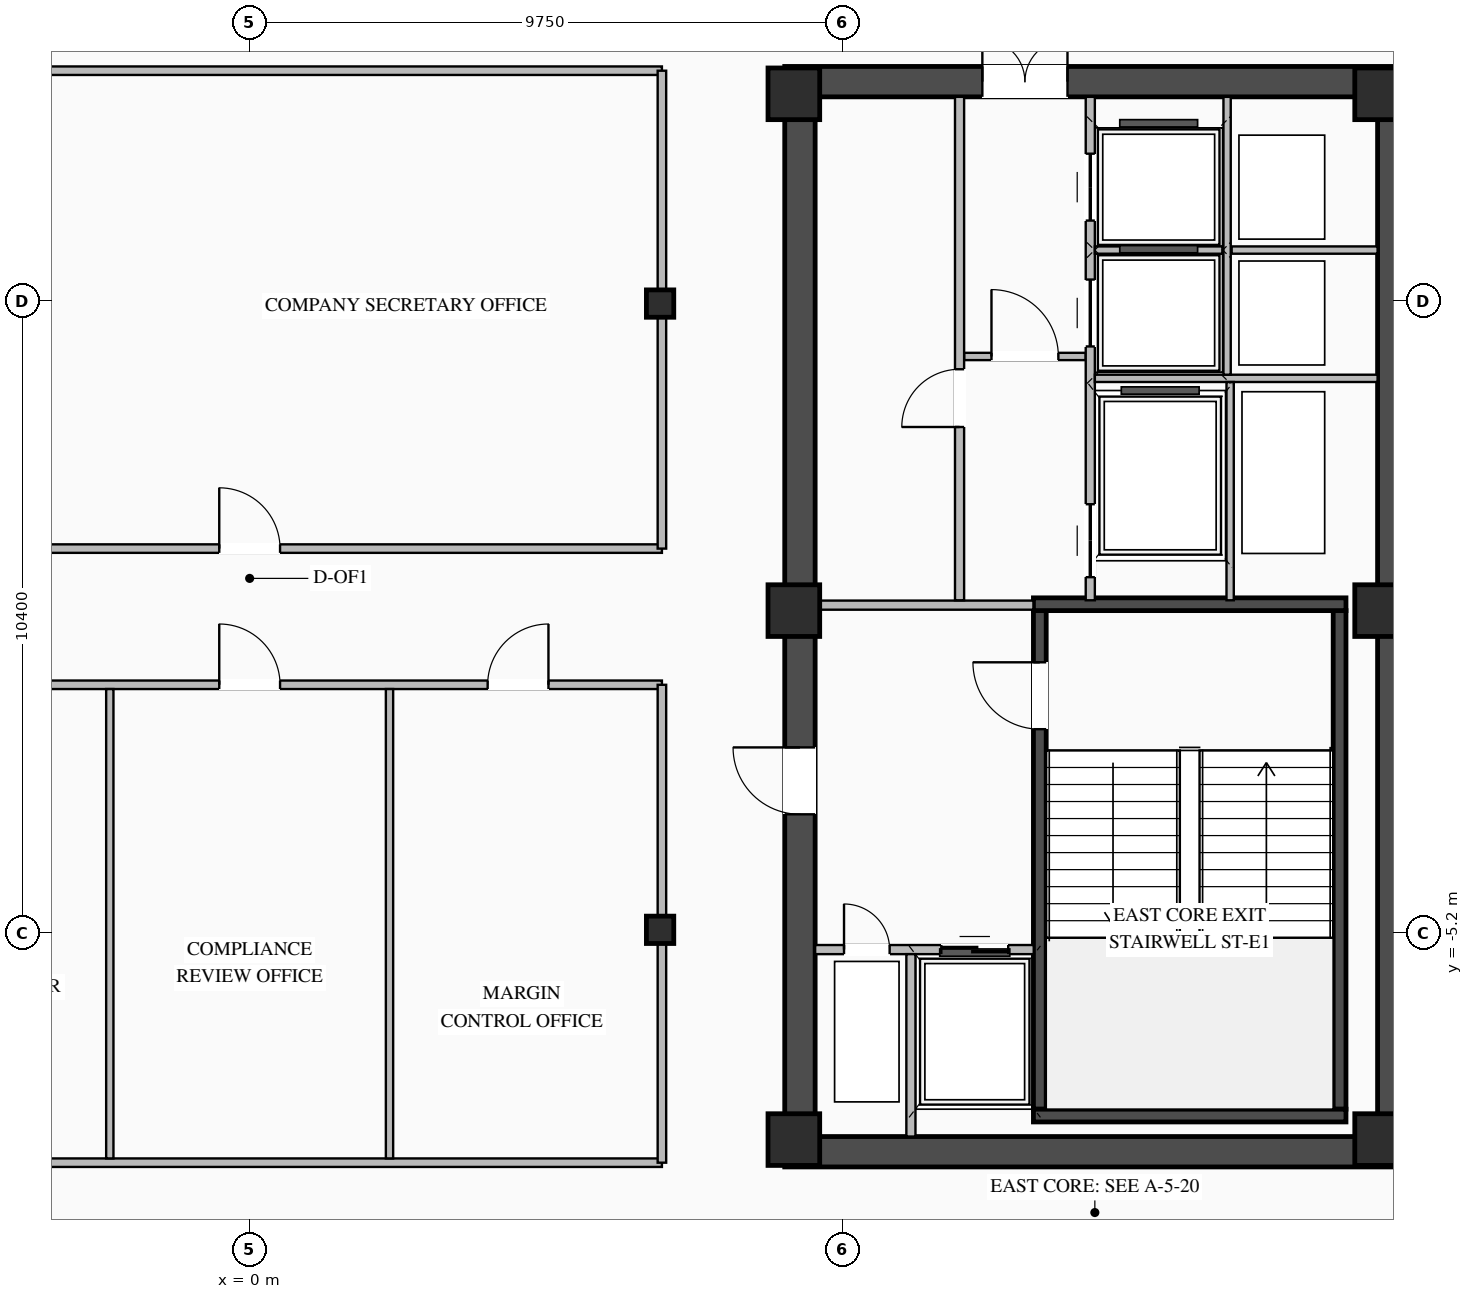
"""IFC4 building model, lengths in metres.
Left out: names, types, materials, properties, quantities, classifications, styles, units other than length and angle.
Written with IfcOpenShell. Run it as: python <this file> out.ifc"""

import sys

from ifc_helpers import new_model, si_unit, direction, frame, frame_2d, origin, origin_2d, place, context, subcontext, project, spatial, rectangle, i_section, extrude, element, fill, save


model = new_model("IFC4")
c1 = context("Model", 3, precision=1e-05, world=origin(), true_north=direction((0.0, 1.0)))
c2 = subcontext(c1, "Body", "Model", "MODEL_VIEW")
j1 = project(units=[si_unit("LENGTHUNIT", "METRE"), si_unit("PLANEANGLEUNIT", "RADIAN")], contexts=[c1])
p1 = place(None, origin())
s1 = spatial("IfcSite", under=j1, at=p1, CompositionType="ELEMENT")
p2 = place(p1, origin())
s2 = spatial("IfcBuilding", under=s1, at=p2, CompositionType="ELEMENT")
p3 = place(p2, frame((0.0, 0.0, 282.75)))
s3 = spatial("IfcBuildingStorey", under=s2, at=p3, CompositionType="ELEMENT", Elevation=282.75)
p4 = place(p3, frame((8.8, -8.8, 0.0), z_axis=(0.0, 0.0, 1.0), x_axis=(1.0, 0.0, 0.0)))
e1 = element("IfcWall", 1, at=p4, inside=s3, PredefinedType="SHEAR", context=c2, shape_type="SweptSolid", body=[
    extrude(rectangle(XDim=10.25, YDim=0.5, at=frame_2d((5.125, 0.0))), origin(), (0.0, 0.0, 1.0), 3.95),
])
p5 = place(p3, frame((8.8, 8.8, 0.0), z_axis=(0.0, 0.0, 1.0), x_axis=(1.0, 0.0, 0.0)))
e2 = element("IfcWall", 2, at=p5, inside=s3, PredefinedType="SHEAR", context=c2, shape_type="SweptSolid", body=[
    extrude(rectangle(XDim=10.25, YDim=0.5, at=frame_2d((5.125, 0.0))), origin(), (0.0, 0.0, 1.0), 3.95),
])
p6 = place(p5, frame((3.25, 0.0, 0.0)))
e3 = element("IfcOpeningElement", 3, at=p6, cuts=e2, PredefinedType="OPENING", context=c2, shape_type="SweptSolid", body=[
    extrude(rectangle(XDim=1.4, YDim=2.05, at=frame_2d((0.7, 1.025))), frame((0.0, 0.26, 0.0), z_axis=(0.0, -1.0, 0.0), x_axis=(1.0, 0.0, 0.0)), (0.0, 0.0, 1.0), 0.52),
])
p7 = place(p3, frame((9.05, -8.55, 0.0), z_axis=(0.0, 0.0, 1.0), x_axis=(0.0, 1.0, 0.0)))
e4 = element("IfcWall", 4, at=p7, inside=s3, PredefinedType="SHEAR", context=c2, shape_type="SweptSolid", body=[
    extrude(rectangle(XDim=17.1, YDim=0.5, at=frame_2d((8.55, 0.0))), origin(), (0.0, 0.0, 1.0), 3.95),
])
p8 = place(p7, frame((5.3, 0.0, 0.0)))
e5 = element("IfcOpeningElement", 5, at=p8, cuts=e4, PredefinedType="OPENING", context=c2, shape_type="SweptSolid", body=[
    extrude(rectangle(XDim=1.1, YDim=2.08, at=frame_2d((0.55, 1.04))), frame((0.0, 0.26, 0.0), z_axis=(0.0, -1.0, 0.0), x_axis=(1.0, 0.0, 0.0)), (0.0, 0.0, 1.0), 0.52),
])
p9 = place(p3, frame((18.8, -8.55, 0.0), z_axis=(0.0, 0.0, 1.0), x_axis=(0.0, 1.0, 0.0)))
e6 = element("IfcWall", 6, at=p9, inside=s3, PredefinedType="SHEAR", context=c2, shape_type="SweptSolid", body=[
    extrude(rectangle(XDim=17.1, YDim=0.5, at=frame_2d((8.55, 0.0))), origin(), (0.0, 0.0, 1.0), 3.95),
])
p10 = place(p3, frame((12.995, -8.1, 0.0), z_axis=(0.0, 0.0, 1.0), x_axis=(0.0, 1.0, 0.0)))
e7 = element("IfcWall", 7, at=p10, inside=s3, PredefinedType="SHEAR", context=c2, shape_type="SweptSolid", body=[
    extrude(rectangle(XDim=8.2, YDim=0.21, at=frame_2d((4.1, 0.0))), origin(), (0.0, 0.0, 1.0), 3.95),
])
p11 = place(p10, frame((6.25, 0.0, 0.0)))
e8 = element("IfcOpeningElement", 8, at=p11, cuts=e7, PredefinedType="OPENING", context=c2, shape_type="SweptSolid", body=[
    extrude(rectangle(XDim=1.1, YDim=2.15, at=frame_2d((0.55, 1.075))), frame((0.0, 0.115, 0.0), z_axis=(0.0, -1.0, 0.0), x_axis=(1.0, 0.0, 0.0)), (0.0, 0.0, 1.0), 0.23),
])
p12 = place(p3, frame((17.925, -8.1, 0.0), z_axis=(0.0, 0.0, 1.0), x_axis=(0.0, 1.0, 0.0)))
e9 = element("IfcWall", 9, at=p12, inside=s3, PredefinedType="SHEAR", context=c2, shape_type="SweptSolid", body=[
    extrude(rectangle(XDim=8.2, YDim=0.21, at=frame_2d((4.1, 0.0))), origin(), (0.0, 0.0, 1.0), 3.95),
])
for number, where, z_axis, x_axis in (
    (10, (12.89, -8.205, 0.0), (0.0, 0.0, 1.0), (1.0, 0.0, 0.0)),
    (11, (18.03, 0.205, 0.0), (0.0, 0.0, 1.0), (-1.0, 0.0, 0.0)),
):
    element("IfcWall", number, at=place(p3, frame(where, z_axis=z_axis, x_axis=x_axis)), inside=s3, PredefinedType="SHEAR", context=c2, shape_type="SweptSolid", body=[
        extrude(rectangle(XDim=5.14, YDim=0.21, at=frame_2d((2.57, 0.0))), origin(), (0.0, 0.0, 1.0), 3.95),
    ])
for number, where, z_axis, x_axis in (
    (12, (8.95, -8.6, 0.0), (0.0, 0.0, 1.0), (1.0, 0.0, 0.0)),
    (13, (8.95, 0.1, 0.0), (0.0, 0.0, 1.0), (1.0, 0.0, 0.0)),
    (14, (8.95, 8.6, 0.0), (0.0, 0.0, 1.0), (1.0, 0.0, 0.0)),
    (15, (18.6, -8.6, 0.0), (0.0, 0.0, 1.0), (1.0, 0.0, 0.0)),
    (16, (18.6, 0.1, 0.0), (0.0, 0.0, 1.0), (1.0, 0.0, 0.0)),
    (17, (18.6, 8.6, 0.0), (0.0, 0.0, 1.0), (1.0, 0.0, 0.0)),
):
    element("IfcColumn", number, at=place(p3, frame(where, z_axis=z_axis, x_axis=x_axis)), inside=s3, PredefinedType="COLUMN", context=c2, shape_type="SweptSolid", body=[
        extrude(rectangle(XDim=0.85, YDim=0.85, at=origin_2d()), origin(), (0.0, 0.0, 1.0), 4.2),
    ])
for number, where, z_axis, x_axis in (
    (18, (6.75, -5.15, 0.0), (0.0, 0.0, 1.0), (1.0, 0.0, 0.0)),
    (19, (6.75, 5.15, 0.0), (0.0, 0.0, 1.0), (1.0, 0.0, 0.0)),
):
    element("IfcColumn", number, at=place(p3, frame(where, z_axis=z_axis, x_axis=x_axis)), inside=s3, PredefinedType="COLUMN", context=c2, shape_type="SweptSolid", body=[
        extrude(i_section(OverallWidth=0.45, OverallDepth=0.45, WebThickness=0.022, FlangeThickness=0.032, at=origin_2d()), origin(), (0.0, 0.0, 1.0), 4.2),
    ])
p13 = place(p3, frame((9.3, -5.475, 0.0), z_axis=(0.0, 0.0, 1.0), x_axis=(1.0, 0.0, 0.0)))
e20 = element("IfcWall", 20, at=p13, inside=s3, PredefinedType="STANDARD", context=c2, shape_type="SweptSolid", body=[
    extrude(rectangle(XDim=3.595, YDim=0.15, at=frame_2d((1.797, 0.0))), origin(), (0.0, 0.0, 1.0), 3.93),
])
p14 = place(p13, frame((2.075, 0.0, 0.0)))
e21 = element("IfcOpeningElement", 21, at=p14, cuts=e20, PredefinedType="OPENING", context=c2, shape_type="SweptSolid", body=[
    extrude(rectangle(XDim=1.1, YDim=2.15, at=frame_2d((0.55, 1.075))), frame((0.0, 0.085, 0.0), z_axis=(0.0, -1.0, 0.0), x_axis=(1.0, 0.0, 0.0)), (0.0, 0.0, 1.0), 0.17),
])
p15 = place(p13, frame((0.475, 0.0, 0.0)))
e22 = element("IfcOpeningElement", 22, at=p15, cuts=e20, PredefinedType="OPENING", context=c2, shape_type="SweptSolid", body=[
    extrude(rectangle(XDim=0.75, YDim=2.05, at=frame_2d((0.375, 1.025))), frame((0.0, 0.085, 0.0), z_axis=(0.0, -1.0, 0.0), x_axis=(1.0, 0.0, 0.0)), (0.0, 0.0, 1.0), 0.17),
])
p16 = place(p3, frame((10.875, -8.55, 0.0), z_axis=(0.0, 0.0, 1.0), x_axis=(0.0, 1.0, 0.0)))
e23 = element("IfcWall", 23, at=p16, inside=s3, PredefinedType="STANDARD", context=c2, shape_type="SweptSolid", body=[
    extrude(rectangle(XDim=3.0, YDim=0.15, at=frame_2d((1.5, 0.0))), origin(), (0.0, 0.0, 1.0), 3.93),
])
p17 = place(p3, frame((9.3, 0.19, 0.0), z_axis=(0.0, 0.0, 1.0), x_axis=(1.0, 0.0, 0.0)))
e24 = element("IfcWall", 24, at=p17, inside=s3, PredefinedType="STANDARD", context=c2, shape_type="SweptSolid", body=[
    extrude(rectangle(XDim=3.59, YDim=0.15, at=frame_2d((1.795, 0.0))), origin(), (0.0, 0.0, 1.0), 3.425),
])
p18 = place(p3, frame((11.75, 4.28, 0.0), z_axis=(0.0, 0.0, 1.0), x_axis=(1.0, 0.0, 0.0)))
e25 = element("IfcWall", 25, at=p18, inside=s3, PredefinedType="STANDARD", context=c2, shape_type="SweptSolid", body=[
    extrude(rectangle(XDim=2.0, YDim=0.12, at=frame_2d((1.0, 0.0))), origin(), (0.0, 0.0, 1.0), 3.93),
])
p19 = place(p18, frame((0.45, 0.0, 0.0)))
e26 = element("IfcOpeningElement", 26, at=p19, cuts=e25, PredefinedType="OPENING", context=c2, shape_type="SweptSolid", body=[
    extrude(rectangle(XDim=1.1, YDim=2.1, at=frame_2d((0.55, 1.05))), frame((0.0, 0.07, 0.0), z_axis=(0.0, -1.0, 0.0), x_axis=(1.0, 0.0, 0.0)), (0.0, 0.0, 1.0), 0.14),
])
p20 = place(p3, frame((11.675, 0.27, 0.0), z_axis=(0.0, 0.0, 1.0), x_axis=(0.0, 1.0, 0.0)))
e27 = element("IfcWall", 27, at=p20, inside=s3, PredefinedType="STANDARD", context=c2, shape_type="SweptSolid", body=[
    extrude(rectangle(XDim=8.28, YDim=0.15, at=frame_2d((4.14, 0.0))), origin(), (0.0, 0.0, 1.0), 3.93),
])
p21 = place(p20, frame((2.85, 0.0, 0.0)))
e28 = element("IfcOpeningElement", 28, at=p21, cuts=e27, PredefinedType="OPENING", context=c2, shape_type="SweptSolid", body=[
    extrude(rectangle(XDim=0.95, YDim=2.05, at=frame_2d((0.475, 1.025))), frame((0.0, 0.085, 0.0), z_axis=(0.0, -1.0, 0.0), x_axis=(1.0, 0.0, 0.0)), (0.0, 0.0, 1.0), 0.17),
])
p22 = place(p3, frame((13.825, 0.27, 0.0), z_axis=(0.0, 0.0, 1.0), x_axis=(0.0, 1.0, 0.0)))
e29 = element("IfcWall", 29, at=p22, inside=s3, PredefinedType="STANDARD", context=c2, shape_type="SweptSolid", body=[
    extrude(rectangle(XDim=8.28, YDim=0.15, at=frame_2d((4.14, 0.0))), origin(), (0.0, 0.0, 1.0), 3.93),
])
p23 = place(p22, frame((4.175, 0.0, 0.0)))
e30 = element("IfcOpeningElement", 30, at=p23, cuts=e29, PredefinedType="OPENING", context=c2, shape_type="SweptSolid", body=[
    extrude(rectangle(XDim=1.1, YDim=2.1, at=frame_2d((0.55, 1.05))), frame((0.0, 0.085, 0.0), z_axis=(0.0, -1.0, 0.0), x_axis=(1.0, 0.0, 0.0)), (0.0, 0.0, 1.0), 0.17),
])
p24 = place(p22, frame((6.245, 0.0, 0.0)))
e31 = element("IfcOpeningElement", 31, at=p24, cuts=e29, PredefinedType="OPENING", context=c2, shape_type="SweptSolid", body=[
    extrude(rectangle(XDim=1.1, YDim=2.1, at=frame_2d((0.55, 1.05))), frame((0.0, 0.085, 0.0), z_axis=(0.0, -1.0, 0.0), x_axis=(1.0, 0.0, 0.0)), (0.0, 0.0, 1.0), 0.17),
])
p25 = place(p22, frame((0.38, 0.0, 0.0)))
e32 = element("IfcOpeningElement", 32, at=p25, cuts=e29, PredefinedType="OPENING", context=c2, shape_type="SweptSolid", body=[
    extrude(rectangle(XDim=1.2, YDim=2.1, at=frame_2d((0.6, 1.05))), frame((0.0, 0.085, 0.0), z_axis=(0.0, -1.0, 0.0), x_axis=(1.0, 0.0, 0.0)), (0.0, 0.0, 1.0), 0.17),
])
p26 = place(p3, frame((13.9, 3.92, 0.0), z_axis=(0.0, 0.0, 1.0), x_axis=(1.0, 0.0, 0.0)))
e33 = element("IfcWall", 33, at=p26, inside=s3, PredefinedType="STANDARD", context=c2, shape_type="SweptSolid", body=[
    extrude(rectangle(XDim=4.65, YDim=0.12, at=frame_2d((2.325, 0.0))), origin(), (0.0, 0.0, 1.0), 3.93),
])
p27 = place(p3, frame((16.15, 6.03, 0.0), z_axis=(0.0, 0.0, 1.0), x_axis=(1.0, 0.0, 0.0)))
e34 = element("IfcWall", 34, at=p27, inside=s3, PredefinedType="STANDARD", context=c2, shape_type="SweptSolid", body=[
    extrude(rectangle(XDim=2.4, YDim=0.12, at=frame_2d((1.2, 0.0))), origin(), (0.0, 0.0, 1.0), 3.93),
])
p28 = place(p3, frame((16.075, 3.98, 0.0), z_axis=(0.0, 0.0, 1.0), x_axis=(0.0, 1.0, 0.0)))
e35 = element("IfcWall", 35, at=p28, inside=s3, PredefinedType="STANDARD", context=c2, shape_type="SweptSolid", body=[
    extrude(rectangle(XDim=4.57, YDim=0.12, at=frame_2d((2.285, 0.0))), origin(), (0.0, 0.0, 1.0), 3.93),
])
p29 = place(p3, frame((13.9, 6.03, 0.0), z_axis=(0.0, 0.0, 1.0), x_axis=(1.0, 0.0, 0.0)))
e36 = element("IfcWall", 36, at=p29, inside=s3, PredefinedType="STANDARD", context=c2, shape_type="SweptSolid", body=[
    extrude(rectangle(XDim=2.1, YDim=0.12, at=frame_2d((1.05, 0.0))), origin(), (0.0, 0.0, 1.0), 3.93),
])
p30 = place(p3, frame((16.125, 0.27, 0.0), z_axis=(0.0, 0.0, 1.0), x_axis=(0.0, 1.0, 0.0)))
e37 = element("IfcWall", 37, at=p30, inside=s3, PredefinedType="STANDARD", context=c2, shape_type="SweptSolid", body=[
    extrude(rectangle(XDim=3.59, YDim=0.12, at=frame_2d((1.795, 0.0))), origin(), (0.0, 0.0, 1.0), 3.93),
])
p31 = place(p3, frame((-6.78, 1.12, 0.0), z_axis=(0.0, 0.0, 1.0), x_axis=(1.0, 0.0, 0.0)))
e38 = element("IfcWall", 38, at=p31, inside=s3, PredefinedType="STANDARD", context=c2, shape_type="SweptSolid", body=[
    extrude(rectangle(XDim=13.56, YDim=0.14, at=frame_2d((6.78, 0.0))), origin(), (0.0, 0.0, 1.0), 3.93),
])
p32 = place(p31, frame((6.28, 0.0, 0.0)))
e39 = element("IfcOpeningElement", 39, at=p32, cuts=e38, PredefinedType="OPENING", context=c2, shape_type="SweptSolid", body=[
    extrude(rectangle(XDim=1.0, YDim=2.08, at=frame_2d((0.5, 1.04))), frame((0.0, 0.08, 0.0), z_axis=(0.0, -1.0, 0.0), x_axis=(1.0, 0.0, 0.0)), (0.0, 0.0, 1.0), 0.16),
])
p33 = place(p3, frame((-6.78, 8.98, 0.0), z_axis=(0.0, 0.0, 1.0), x_axis=(1.0, 0.0, 0.0)))
e40 = element("IfcWall", 40, at=p33, inside=s3, PredefinedType="STANDARD", context=c2, shape_type="SweptSolid", body=[
    extrude(rectangle(XDim=13.56, YDim=0.14, at=frame_2d((6.78, 0.0))), origin(), (0.0, 0.0, 1.0), 3.93),
])
p34 = place(p3, frame((6.78, 1.12, 0.0), z_axis=(0.0, 0.0, 1.0), x_axis=(0.0, 1.0, 0.0)))
e41 = element("IfcWall", 41, at=p34, inside=s3, PredefinedType="STANDARD", context=c2, shape_type="SweptSolid", body=[
    extrude(rectangle(XDim=7.86, YDim=0.14, at=frame_2d((3.93, 0.0))), origin(), (0.0, 0.0, 1.0), 3.425),
])
p35 = place(p3, frame((-6.78, -1.12, 0.0), z_axis=(0.0, 0.0, 1.0), x_axis=(1.0, 0.0, 0.0)))
e42 = element("IfcWall", 42, at=p35, inside=s3, PredefinedType="STANDARD", context=c2, shape_type="SweptSolid", body=[
    extrude(rectangle(XDim=13.56, YDim=0.14, at=frame_2d((6.78, 0.0))), origin(), (0.0, 0.0, 1.0), 3.93),
])
p36 = place(p35, frame((1.866, 0.0, 0.0)))
e43 = element("IfcOpeningElement", 43, at=p36, cuts=e42, PredefinedType="OPENING", context=c2, shape_type="SweptSolid", body=[
    extrude(rectangle(XDim=1.0, YDim=2.08, at=frame_2d((0.5, 1.04))), frame((0.0, 0.08, 0.0), z_axis=(0.0, -1.0, 0.0), x_axis=(1.0, 0.0, 0.0)), (0.0, 0.0, 1.0), 0.16),
])
p37 = place(p35, frame((6.28, 0.0, 0.0)))
e44 = element("IfcOpeningElement", 44, at=p37, cuts=e42, PredefinedType="OPENING", context=c2, shape_type="SweptSolid", body=[
    extrude(rectangle(XDim=1.0, YDim=2.08, at=frame_2d((0.5, 1.04))), frame((0.0, 0.08, 0.0), z_axis=(0.0, -1.0, 0.0), x_axis=(1.0, 0.0, 0.0)), (0.0, 0.0, 1.0), 0.16),
])
p38 = place(p35, frame((10.694, 0.0, 0.0)))
e45 = element("IfcOpeningElement", 45, at=p38, cuts=e42, PredefinedType="OPENING", context=c2, shape_type="SweptSolid", body=[
    extrude(rectangle(XDim=1.0, YDim=2.08, at=frame_2d((0.5, 1.04))), frame((0.0, 0.08, 0.0), z_axis=(0.0, -1.0, 0.0), x_axis=(1.0, 0.0, 0.0)), (0.0, 0.0, 1.0), 0.16),
])
p39 = place(p3, frame((-6.78, -8.98, 0.0), z_axis=(0.0, 0.0, 1.0), x_axis=(1.0, 0.0, 0.0)))
e46 = element("IfcWall", 46, at=p39, inside=s3, PredefinedType="STANDARD", context=c2, shape_type="SweptSolid", body=[
    extrude(rectangle(XDim=13.56, YDim=0.14, at=frame_2d((6.78, 0.0))), origin(), (0.0, 0.0, 1.0), 3.93),
])
p40 = place(p3, frame((6.78, -8.98, 0.0), z_axis=(0.0, 0.0, 1.0), x_axis=(0.0, 1.0, 0.0)))
e47 = element("IfcWall", 47, at=p40, inside=s3, PredefinedType="STANDARD", context=c2, shape_type="SweptSolid", body=[
    extrude(rectangle(XDim=7.86, YDim=0.14, at=frame_2d((3.93, 0.0))), origin(), (0.0, 0.0, 1.0), 3.425),
])
for number, where, z_axis, x_axis in (
    (48, (-2.3, -8.91, 0.0), (0.0, 0.0, 1.0), (0.0, 1.0, 0.0)),
    (49, (2.3, -8.91, 0.0), (0.0, 0.0, 1.0), (0.0, 1.0, 0.0)),
):
    element("IfcWall", number, at=place(p3, frame(where, z_axis=z_axis, x_axis=x_axis)), inside=s3, PredefinedType="STANDARD", context=c2, shape_type="SweptSolid", body=[
        extrude(rectangle(XDim=7.72, YDim=0.12, at=frame_2d((3.86, 0.0))), origin(), (0.0, 0.0, 1.0), 3.93),
    ])
p41 = place(p11, origin())
e50 = element("IfcDoor", 50, at=p41, inside=s3, OperationType="SINGLE_SWING_RIGHT", PredefinedType="DOOR", context=c2, shape_type="SweptSolid", body=[
    extrude(rectangle(XDim=1.1, YDim=2.15, at=frame_2d((0.55, 1.075))), frame((0.0, 0.025, 0.0), z_axis=(0.0, -1.0, 0.0), x_axis=(1.0, 0.0, 0.0)), (0.0, 0.0, 1.0), 0.05),
])
fill(e8, e50)
p42 = place(p14, origin())
e51 = element("IfcDoor", 51, at=p42, inside=s3, OperationType="DOUBLE_DOOR_SLIDING", PredefinedType="DOOR", context=c2, shape_type="SweptSolid", body=[
    extrude(rectangle(XDim=1.1, YDim=2.15, at=frame_2d((0.55, 1.075))), frame((0.0, 0.025, 0.0), z_axis=(0.0, -1.0, 0.0), x_axis=(1.0, 0.0, 0.0)), (0.0, 0.0, 1.0), 0.05),
])
fill(e21, e51)
p43 = place(p15, origin())
e52 = element("IfcDoor", 52, at=p43, inside=s3, OperationType="SINGLE_SWING_LEFT", PredefinedType="DOOR", context=c2, shape_type="SweptSolid", body=[
    extrude(rectangle(XDim=0.75, YDim=2.05, at=frame_2d((0.375, 1.025))), frame((0.0, 0.025, 0.0), z_axis=(0.0, -1.0, 0.0), x_axis=(1.0, 0.0, 0.0)), (0.0, 0.0, 1.0), 0.05),
])
fill(e22, e52)
p44 = place(p8, origin())
e53 = element("IfcDoor", 53, at=p44, inside=s3, OperationType="SINGLE_SWING_RIGHT", PredefinedType="DOOR", context=c2, shape_type="SweptSolid", body=[
    extrude(rectangle(XDim=1.1, YDim=2.08, at=frame_2d((0.55, 1.04))), frame((0.0, -0.155, 0.0), z_axis=(0.0, -1.0, 0.0), x_axis=(1.0, 0.0, 0.0)), (0.0, 0.0, 1.0), 0.05),
])
fill(e5, e53)
p45 = place(p19, origin())
e54 = element("IfcDoor", 54, at=p45, inside=s3, OperationType="SINGLE_SWING_LEFT", PredefinedType="DOOR", context=c2, shape_type="SweptSolid", body=[
    extrude(rectangle(XDim=1.1, YDim=2.1, at=frame_2d((0.55, 1.05))), frame((0.0, 0.025, 0.0), z_axis=(0.0, -1.0, 0.0), x_axis=(1.0, 0.0, 0.0)), (0.0, 0.0, 1.0), 0.05),
])
fill(e26, e54)
p46 = place(p6, origin())
e55 = element("IfcDoor", 55, at=p46, inside=s3, OperationType="DOUBLE_DOOR_SINGLE_SWING", PredefinedType="DOOR", context=c2, shape_type="SweptSolid", body=[
    extrude(rectangle(XDim=1.4, YDim=2.05, at=frame_2d((0.7, 1.025))), frame((0.0, 0.195, 0.0), z_axis=(0.0, -1.0, 0.0), x_axis=(1.0, 0.0, 0.0)), (0.0, 0.0, 1.0), 0.05),
])
fill(e3, e55)
p47 = place(p21, origin())
e56 = element("IfcDoor", 56, at=p47, inside=s3, OperationType="SINGLE_SWING_LEFT", PredefinedType="DOOR", context=c2, shape_type="SweptSolid", body=[
    extrude(rectangle(XDim=0.95, YDim=2.05, at=frame_2d((0.475, 1.025))), frame((0.0, 0.025, 0.0), z_axis=(0.0, -1.0, 0.0), x_axis=(1.0, 0.0, 0.0)), (0.0, 0.0, 1.0), 0.05),
])
fill(e28, e56)
p48 = place(p23, origin())
e57 = element("IfcDoor", 57, at=p48, inside=s3, OperationType="DOUBLE_DOOR_SLIDING", PredefinedType="DOOR", context=c2, shape_type="SweptSolid", body=[
    extrude(rectangle(XDim=1.1, YDim=2.1, at=frame_2d((0.55, 1.05))), frame((0.0, 0.025, 0.0), z_axis=(0.0, -1.0, 0.0), x_axis=(1.0, 0.0, 0.0)), (0.0, 0.0, 1.0), 0.05),
])
fill(e30, e57)
p49 = place(p24, origin())
e58 = element("IfcDoor", 58, at=p49, inside=s3, OperationType="DOUBLE_DOOR_SLIDING", PredefinedType="DOOR", context=c2, shape_type="SweptSolid", body=[
    extrude(rectangle(XDim=1.1, YDim=2.1, at=frame_2d((0.55, 1.05))), frame((0.0, 0.025, 0.0), z_axis=(0.0, -1.0, 0.0), x_axis=(1.0, 0.0, 0.0)), (0.0, 0.0, 1.0), 0.05),
])
fill(e31, e58)
p50 = place(p25, origin())
e59 = element("IfcDoor", 59, at=p50, inside=s3, OperationType="DOUBLE_DOOR_SLIDING", PredefinedType="DOOR", context=c2, shape_type="SweptSolid", body=[
    extrude(rectangle(XDim=1.2, YDim=2.1, at=frame_2d((0.6, 1.05))), frame((0.0, 0.025, 0.0), z_axis=(0.0, -1.0, 0.0), x_axis=(1.0, 0.0, 0.0)), (0.0, 0.0, 1.0), 0.05),
])
fill(e32, e59)
p51 = place(p32, origin())
e60 = element("IfcDoor", 60, at=p51, inside=s3, OperationType="SINGLE_SWING_LEFT", PredefinedType="DOOR", context=c2, shape_type="SweptSolid", body=[
    extrude(rectangle(XDim=1.0, YDim=2.08, at=frame_2d((0.5, 1.04))), frame((0.0, 0.025, 0.0), z_axis=(0.0, -1.0, 0.0), x_axis=(1.0, 0.0, 0.0)), (0.0, 0.0, 1.0), 0.05),
])
fill(e39, e60)
p52 = place(p37, origin())
e61 = element("IfcDoor", 61, at=p52, inside=s3, OperationType="SINGLE_SWING_LEFT", PredefinedType="DOOR", context=c2, shape_type="SweptSolid", body=[
    extrude(rectangle(XDim=1.0, YDim=2.08, at=frame_2d((0.5, 1.04))), frame((0.0, 0.025, 0.0), z_axis=(0.0, -1.0, 0.0), x_axis=(1.0, 0.0, 0.0)), (0.0, 0.0, 1.0), 0.05),
])
fill(e44, e61)
p53 = place(p38, origin())
e62 = element("IfcDoor", 62, at=p53, inside=s3, OperationType="SINGLE_SWING_RIGHT", PredefinedType="DOOR", context=c2, shape_type="SweptSolid", body=[
    extrude(rectangle(XDim=1.0, YDim=2.08, at=frame_2d((0.5, 1.04))), frame((0.0, 0.025, 0.0), z_axis=(0.0, -1.0, 0.0), x_axis=(1.0, 0.0, 0.0)), (0.0, 0.0, 1.0), 0.05),
])
fill(e45, e62)
save(model, sys.argv[1])
